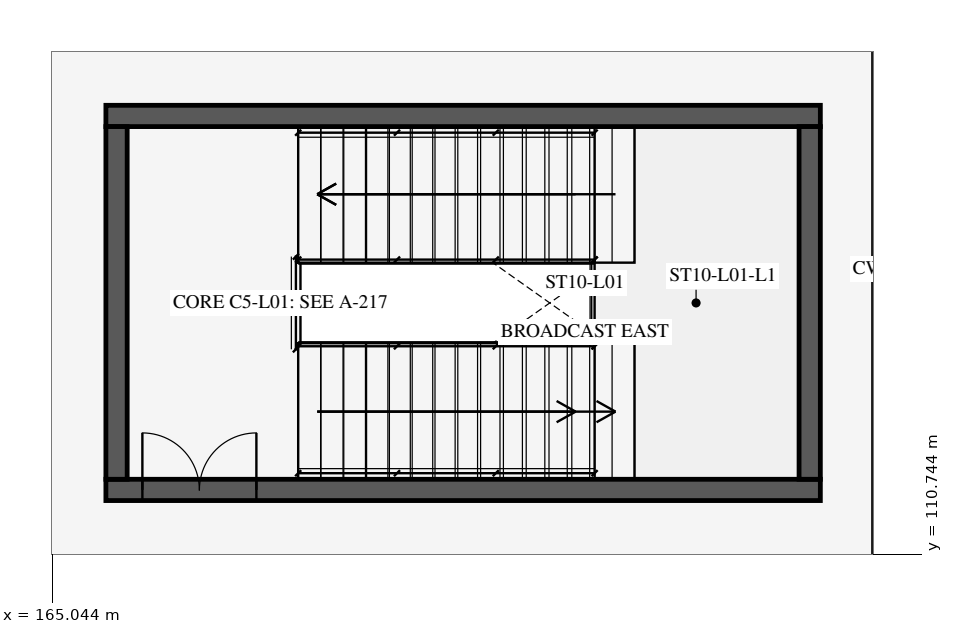
"""IFC4 building model, lengths in metres.
Left out: names, types, materials, properties, quantities, classifications, styles, units other than length and angle.
Written with IfcOpenShell. Run it as: python <this file> out.ifc"""

import sys

from ifc_helpers import new_model, si_unit, direction, frame, frame_2d, origin, place, context, subcontext, project, spatial, rectangle, extrude, element, fill, save


model = new_model("IFC4")
c1 = context("Model", 3, precision=1e-05, world=origin(), true_north=direction((0.0, 1.0)))
c2 = subcontext(c1, "Body", "Model", "MODEL_VIEW")
j1 = project(units=[si_unit("LENGTHUNIT", "METRE"), si_unit("PLANEANGLEUNIT", "RADIAN")], contexts=[c1])
p1 = place(None, origin())
s1 = spatial("IfcSite", under=j1, at=p1, CompositionType="ELEMENT")
p2 = place(p1, origin())
s2 = spatial("IfcBuilding", under=s1, at=p2, CompositionType="ELEMENT")
p3 = place(p2, frame((0.0, 0.0, 5.4)))
s3 = spatial("IfcBuildingStorey", under=s2, at=p3, CompositionType="ELEMENT", Elevation=5.4)
p4 = place(p3, frame((165.75, 111.59, 0.0), z_axis=(0.0, 0.0, 1.0), x_axis=(1.0, 0.0, 0.0)))
e1 = element("IfcWall", 1, at=p4, inside=s3, PredefinedType="SHEAR", context=c2, shape_type="SweptSolid", body=[
    extrude(rectangle(XDim=9.4, YDim=0.28, at=frame_2d((4.7, 0.0))), origin(), (0.0, 0.0, 1.0), 4.56),
])
p5 = place(p4, frame((0.48, 0.0, 0.0)))
e2 = element("IfcOpeningElement", 2, at=p5, cuts=e1, PredefinedType="OPENING", context=c2, shape_type="SweptSolid", body=[
    extrude(rectangle(XDim=1.5, YDim=2.3, at=frame_2d((0.75, 1.15))), frame((0.0, 0.152, 0.0), z_axis=(0.0, -1.0, 0.0), x_axis=(1.0, 0.0, 0.0)), (0.0, 0.0, 1.0), 0.304),
])
p6 = place(p3, frame((165.75, 116.51, 0.0), z_axis=(0.0, 0.0, 1.0), x_axis=(1.0, 0.0, 0.0)))
e3 = element("IfcWall", 3, at=p6, inside=s3, PredefinedType="SHEAR", context=c2, shape_type="SweptSolid", body=[
    extrude(rectangle(XDim=9.4, YDim=0.28, at=frame_2d((4.7, 0.0))), origin(), (0.0, 0.0, 1.0), 4.56),
])
for number, where, z_axis, x_axis in (
    (4, (165.89, 111.73, 0.0), (0.0, 0.0, 1.0), (0.0, 1.0, 0.0)),
    (5, (175.01, 111.73, 0.0), (0.0, 0.0, 1.0), (0.0, 1.0, 0.0)),
):
    element("IfcWall", number, at=place(p3, frame(where, z_axis=z_axis, x_axis=x_axis)), inside=s3, PredefinedType="SHEAR", context=c2, shape_type="SweptSolid", body=[
        extrude(rectangle(XDim=4.64, YDim=0.28, at=frame_2d((2.32, 0.0))), origin(), (0.0, 0.0, 1.0), 4.56),
    ])
p7 = place(p5, origin())
e6 = element("IfcDoor", 6, at=p7, inside=s3, OperationType="DOUBLE_DOOR_SINGLE_SWING", PredefinedType="DOOR", context=c2, shape_type="SweptSolid", body=[
    extrude(rectangle(XDim=1.5, YDim=2.3, at=frame_2d((0.75, 1.15))), frame((0.0, 0.025, 0.0), z_axis=(0.0, -1.0, 0.0), x_axis=(1.0, 0.0, 0.0)), (0.0, 0.0, 1.0), 0.05),
])
fill(e2, e6)
save(model, sys.argv[1])
